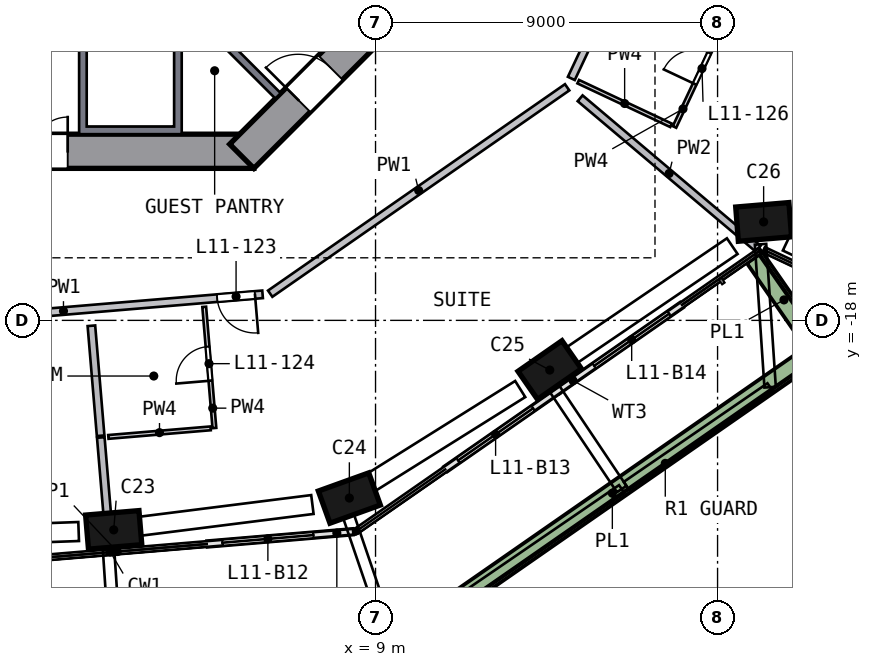
"""IFC4 building model, lengths in metres.
Left out: names, types, materials, properties, quantities, classifications, styles, units other than length and angle.
Written with IfcOpenShell. Run it as: python <this file> out.ifc"""

import sys

from ifc_helpers import new_model, si_unit, direction, frame, frame_2d, origin, origin_2d, place, context, subcontext, project, spatial, polyline, rectangle, outline, extrude, element, fill, save


model = new_model("IFC4")
c1 = context("Model", 3, precision=1e-05, world=origin(), true_north=direction((0.0, 1.0)))
c2 = subcontext(c1, "Body", "Model", "MODEL_VIEW")
j1 = project(units=[si_unit("LENGTHUNIT", "METRE"), si_unit("PLANEANGLEUNIT", "RADIAN")], contexts=[c1])
p1 = place(None, origin())
s1 = spatial("IfcSite", under=j1, at=p1, CompositionType="ELEMENT")
p2 = place(p1, origin())
s2 = spatial("IfcBuilding", under=s1, at=p2, CompositionType="ELEMENT")
p3 = place(p2, frame((0.0, 0.0, 53.0)))
s3 = spatial("IfcBuildingStorey", under=s2, at=p3, CompositionType="ELEMENT", Elevation=53.0)
p4 = place(p3, frame((1.976, -23.525, 0.0), z_axis=(0.111794513, 0.010266843, 0.993678307), x_axis=(0.990250205, 0.082474278, -0.11226097)))
e1 = element("IfcColumn", 1, at=p4, inside=s3, PredefinedType="COLUMN", context=c2, shape_type="SweptSolid", body=[
    extrude(rectangle(XDim=1.4, YDim=0.9, at=origin_2d()), origin(), (0.0, 0.0, 1.0), 3.21),
])
p5 = place(p3, frame((8.181, -22.723, 0.0), z_axis=(0.107731963, 0.03976275, 0.993384491), x_axis=(-0.934820186, -0.336043012, 0.114831678)))
e2 = element("IfcColumn", 2, at=p5, inside=s3, PredefinedType="COLUMN", context=c2, shape_type="SweptSolid", body=[
    extrude(rectangle(XDim=1.4, YDim=0.9, at=origin_2d()), origin(), (0.0, 0.0, 1.0), 3.211),
])
p6 = place(p3, frame((13.474, -19.386, 0.0), z_axis=(0.091640946, 0.064871143, 0.993676845), x_axis=(0.815879269, 0.567217406, -0.112273915)))
e3 = element("IfcColumn", 3, at=p6, inside=s3, PredefinedType="COLUMN", context=c2, shape_type="SweptSolid", body=[
    extrude(rectangle(XDim=1.4, YDim=0.9, at=origin_2d()), origin(), (0.0, 0.0, 1.0), 3.21),
])
p7 = place(p3, frame((19.124, -15.52, 0.0), z_axis=(0.073043234, 0.091589071, 0.993114358), x_axis=(-0.993826622, -0.076691997, 0.080168471)))
e4 = element("IfcColumn", 4, at=p7, inside=s3, PredefinedType="COLUMN", context=c2, shape_type="SweptSolid", body=[
    extrude(rectangle(XDim=1.4, YDim=0.9, at=origin_2d()), origin(), (0.0, 0.0, 1.0), 3.212),
])
p8 = place(p3, frame((-5.799, -13.55, 0.0), z_axis=(0.0, 0.0, 1.0), x_axis=(1.0, 0.0, 0.0)))
e5 = element("IfcWall", 5, at=p8, inside=s3, PredefinedType="SHEAR", context=c2, shape_type="SweptSolid", body=[
    extrude(rectangle(XDim=11.598, YDim=0.9, at=frame_2d((5.799, 0.0))), origin(), (0.0, 0.0, 1.0), 3.5),
])
p9 = place(p8, frame((4.899, 0.0, 0.0)))
e6 = element("IfcOpeningElement", 6, at=p9, cuts=e5, PredefinedType="OPENING", context=c2, shape_type="SweptSolid", body=[
    extrude(rectangle(XDim=1.8, YDim=2.1, at=frame_2d((0.9, 1.05))), frame((0.0, 0.46, 0.0), z_axis=(0.0, -1.0, 0.0), x_axis=(1.0, 0.0, 0.0)), (0.0, 0.0, 1.0), 0.92),
])
p10 = place(p3, frame((5.481, -13.682, 0.0), z_axis=(0.0, 0.0, 1.0), x_axis=(0.707106781, 0.707106781, 0.0)))
e7 = element("IfcWall", 7, at=p10, inside=s3, PredefinedType="SHEAR", context=c2, shape_type="SweptSolid", body=[
    extrude(rectangle(XDim=11.598, YDim=0.9, at=frame_2d((5.799, 0.0))), origin(), (0.0, 0.0, 1.0), 3.5),
])
p11 = place(p10, frame((2.099, 0.0, 0.0)))
e8 = element("IfcOpeningElement", 8, at=p11, cuts=e7, PredefinedType="OPENING", context=c2, shape_type="SweptSolid", body=[
    extrude(rectangle(XDim=1.2, YDim=2.1, at=frame_2d((0.6, 1.05))), frame((0.0, 0.46, 0.0), z_axis=(0.0, -1.0, 0.0), x_axis=(1.0, 0.0, 0.0)), (0.0, 0.0, 1.0), 0.92),
])
p12 = place(p3, frame((4.573, -23.885, 0.0), z_axis=(0.0, 0.0, 1.0), x_axis=(0.996491197, 0.083697634, 0.0)))
e9 = element("IfcWall", 9, at=p12, inside=s3, PredefinedType="SOLIDWALL", context=c2, shape_type="SweptSolid", body=[
    extrude(rectangle(XDim=3.842, YDim=0.15, at=frame_2d((1.921, 0.0))), origin(), (0.0, 0.0, 1.0), 2.425),
])
p13 = place(p12, frame((0.4, 0.0, 0.0)))
e10 = element("IfcOpeningElement", 10, at=p13, cuts=e9, PredefinedType="OPENING", context=c2, shape_type="SweptSolid", body=[
    extrude(rectangle(XDim=2.4, YDim=2.4, at=frame_2d((1.2, 1.2))), frame((0.0, 0.085, 0.0), z_axis=(0.0, -1.0, 0.0), x_axis=(1.0, 0.0, 0.0)), (0.0, 0.0, 1.0), 0.17),
])
p14 = place(p3, frame((10.846, -21.913, 0.0), z_axis=(0.0, 0.0, 1.0), x_axis=(0.821158084, 0.570700799, 0.0)))
e11 = element("IfcWall", 11, at=p14, inside=s3, PredefinedType="SOLIDWALL", context=c2, shape_type="SweptSolid", body=[
    extrude(rectangle(XDim=3.6, YDim=0.15, at=frame_2d((1.8, 0.0))), origin(), (0.0, 0.0, 1.0), 2.425),
])
p15 = place(p14, frame((0.4, 0.0, 0.0)))
e12 = element("IfcOpeningElement", 12, at=p15, cuts=e11, PredefinedType="OPENING", context=c2, shape_type="SweptSolid", body=[
    extrude(rectangle(XDim=2.4, YDim=2.4, at=frame_2d((1.2, 1.2))), frame((0.0, 0.085, 0.0), z_axis=(0.0, -1.0, 0.0), x_axis=(1.0, 0.0, 0.0)), (0.0, 0.0, 1.0), 0.17),
])
p16 = place(p3, frame((13.802, -19.858, 0.0), z_axis=(0.0, 0.0, 1.0), x_axis=(0.821158921, 0.570699594, 0.0)))
e13 = element("IfcWall", 13, at=p16, inside=s3, PredefinedType="SOLIDWALL", context=c2, shape_type="SweptSolid", body=[
    extrude(rectangle(XDim=3.96, YDim=0.15, at=frame_2d((1.98, 0.0))), origin(), (0.0, 0.0, 1.0), 2.425),
])
p17 = place(p16, frame((1.16, 0.0, 0.0)))
e14 = element("IfcOpeningElement", 14, at=p17, cuts=e13, PredefinedType="OPENING", context=c2, shape_type="SweptSolid", body=[
    extrude(rectangle(XDim=2.4, YDim=2.4, at=frame_2d((1.2, 1.2))), frame((0.0, 0.085, 0.0), z_axis=(0.0, -1.0, 0.0), x_axis=(1.0, 0.0, 0.0)), (0.0, 0.0, 1.0), 0.17),
])
p18 = place(p3, frame((9.597, -26.465, 0.0), z_axis=(0.0, 0.0, 1.0), x_axis=(0.821154593, 0.570705822, 0.0)))
e15 = element("IfcWall", 15, at=p18, inside=s3, PredefinedType="SOLIDWALL", context=c2, shape_type="SweptSolid", body=[
    extrude(rectangle(XDim=13.723, YDim=0.5, at=frame_2d((6.862, 0.0))), origin(), (0.0, 0.0, 1.0), 0.7),
])
p19 = place(p3, frame((20.518, -18.57, 0.0), z_axis=(0.0, 0.0, 1.0), x_axis=(-0.570690734, 0.821165079, 0.0)))
e16 = element("IfcWall", 16, at=p19, inside=s3, PredefinedType="SOLIDWALL", context=c2, shape_type="SweptSolid", body=[
    extrude(rectangle(XDim=2.699, YDim=0.5, at=frame_2d((1.35, 0.0))), origin(), (0.0, 0.0, 1.0), 0.7),
])
p20 = place(p3, origin())
e17 = element("IfcWall", 17, at=p20, inside=s3, PredefinedType="SOLIDWALL", context=c2, shape_type="SweptSolid", body=[
    extrude(outline(polyline([(3.9, -10.7), (3.9, -13.1), (1.2, -13.1), (1.2, -10.7), (3.9, -10.7)]), holes=[polyline([(1.4, -12.9), (3.7, -12.9), (3.7, -10.9), (1.4, -10.9), (1.4, -12.9)])]), origin(), (0.0, 0.0, 1.0), 3.19),
])
p21 = place(p3, frame((3.677, -9.334, 0.0), z_axis=(0.0, 0.0, 1.0), x_axis=(0.707106781, -0.707106781, 0.0)))
e18 = element("IfcWall", 18, at=p21, inside=s3, PredefinedType="SOLIDWALL", context=c2, shape_type="SweptSolid", body=[
    extrude(rectangle(XDim=3.9, YDim=0.2, at=frame_2d((1.95, 0.0))), origin(), (0.0, 0.0, 1.0), 3.19),
])
p22 = place(p3, frame((6.028, -17.315, 0.0), z_axis=(0.0, 0.0, 1.0), x_axis=(-0.996493661, -0.083668294, 0.0)))
e19 = element("IfcWall", 19, at=p22, inside=s3, PredefinedType="SOLIDWALL", context=c2, shape_type="SweptSolid", body=[
    extrude(rectangle(XDim=9.116, YDim=0.2, at=frame_2d((4.558, 0.0))), origin(), (0.0, 0.0, 1.0), 3.19),
])
p23 = place(p22, frame((0.2, 0.0, 0.0)))
e20 = element("IfcOpeningElement", 20, at=p23, cuts=e19, PredefinedType="OPENING", context=c2, shape_type="SweptSolid", body=[
    extrude(rectangle(XDim=1.0, YDim=2.1, at=frame_2d((0.5, 1.05))), frame((0.0, 0.11, 0.0), z_axis=(0.0, -1.0, 0.0), x_axis=(1.0, 0.0, 0.0)), (0.0, 0.0, 1.0), 0.22),
])
p24 = place(p3, frame((6.228, -17.298, 0.0), z_axis=(0.0, 0.0, 1.0), x_axis=(0.821154553, 0.570705878, 0.0)))
e21 = element("IfcWall", 21, at=p24, inside=s3, PredefinedType="SOLIDWALL", context=c2, shape_type="SweptSolid", body=[
    extrude(rectangle(XDim=9.516, YDim=0.2, at=frame_2d((4.758, 0.0))), origin(), (0.0, 0.0, 1.0), 3.19),
])
p25 = place(p3, frame((14.152, -11.633, 0.0), z_axis=(0.0, 0.0, 1.0), x_axis=(0.425803952, 0.904815448, 0.0)))
e22 = element("IfcWall", 22, at=p25, inside=s3, PredefinedType="SOLIDWALL", context=c2, shape_type="SweptSolid", body=[
    extrude(rectangle(XDim=3.4, YDim=0.2, at=frame_2d((1.7, 0.0))), origin(), (0.0, 0.0, 1.0), 3.19),
])
p26 = place(p3, frame((31.011, -15.809, 0.0), z_axis=(0.0, 0.0, 1.0), x_axis=(-0.904825276, 0.425783066, 0.0)))
e23 = element("IfcWall", 23, at=p26, inside=s3, PredefinedType="SOLIDWALL", context=c2, shape_type="SweptSolid", body=[
    extrude(rectangle(XDim=16.833, YDim=0.2, at=frame_2d((8.416, 0.0))), origin(), (0.0, 0.0, 1.0), 3.19),
])
p27 = place(p26, frame((9.0, 0.0, 0.0)))
e24 = element("IfcOpeningElement", 24, at=p27, cuts=e23, PredefinedType="OPENING", context=c2, shape_type="SweptSolid", body=[
    extrude(rectangle(XDim=1.0, YDim=2.1, at=frame_2d((0.5, 1.05))), frame((0.0, 0.11, 0.0), z_axis=(0.0, -1.0, 0.0), x_axis=(1.0, 0.0, 0.0)), (0.0, 0.0, 1.0), 0.22),
])
p28 = place(p3, frame((16.537, -6.566, 0.0), z_axis=(0.0, 0.0, 1.0), x_axis=(0.904826173, -0.42578116, 0.0)))
e25 = element("IfcWall", 25, at=p28, inside=s3, PredefinedType="SOLIDWALL", context=c2, shape_type="SweptSolid", body=[
    extrude(rectangle(XDim=17.033, YDim=0.2, at=frame_2d((8.516, 0.0))), origin(), (0.0, 0.0, 1.0), 3.19),
])
p29 = place(p28, frame((4.05, 0.0, 0.0)))
e26 = element("IfcOpeningElement", 26, at=p29, cuts=e25, PredefinedType="OPENING", context=c2, shape_type="SweptSolid", body=[
    extrude(rectangle(XDim=1.0, YDim=2.1, at=frame_2d((0.5, 1.05))), frame((0.0, 0.11, 0.0), z_axis=(0.0, -1.0, 0.0), x_axis=(1.0, 0.0, 0.0)), (0.0, 0.0, 1.0), 0.22),
])
p30 = place(p3, frame((1.523, -18.142, 0.0), z_axis=(0.0, 0.0, 1.0), x_axis=(0.083706209, -0.996490477, 0.0)))
e27 = element("IfcWall", 27, at=p30, inside=s3, PredefinedType="SOLIDWALL", context=c2, shape_type="SweptSolid", body=[
    extrude(rectangle(XDim=2.905, YDim=0.2, at=frame_2d((1.453, 0.0))), origin(), (0.0, 0.0, 1.0), 3.19),
])
p31 = place(p3, frame((1.77, -21.082, 0.0), z_axis=(0.0, 0.0, 1.0), x_axis=(0.083695681, -0.996491361, 0.0)))
e28 = element("IfcWall", 28, at=p31, inside=s3, PredefinedType="SOLIDWALL", context=c2, shape_type="SweptSolid", body=[
    extrude(rectangle(XDim=2.952, YDim=0.2, at=frame_2d((1.476, 0.0))), origin(), (0.0, 0.0, 1.0), 3.19),
])
p32 = place(p3, frame((14.384, -12.155, 0.0), z_axis=(0.0, 0.0, 1.0), x_axis=(0.763790865, -0.645463798, 0.0)))
e29 = element("IfcWall", 29, at=p32, inside=s3, PredefinedType="SOLIDWALL", context=c2, shape_type="SweptSolid", body=[
    extrude(rectangle(XDim=6.132, YDim=0.2, at=frame_2d((3.066, 0.0))), origin(), (0.0, 0.0, 1.0), 3.19),
])
p33 = place(p3, frame((4.66, -20.842, 0.0), z_axis=(0.0, 0.0, 1.0), x_axis=(-0.996496321, -0.083636612, 0.0)))
e30 = element("IfcWall", 30, at=p33, inside=s3, PredefinedType="PARTITIONING", context=c2, shape_type="SweptSolid", body=[
    extrude(rectangle(XDim=2.7, YDim=0.1, at=frame_2d((1.35, 0.0))), origin(), (0.0, 0.0, 1.0), 3.19),
])
p34 = place(p3, frame((4.76, -20.833, 0.0), z_axis=(0.0, 0.0, 1.0), x_axis=(-0.083695813, 0.99649135, 0.0)))
e31 = element("IfcWall", 31, at=p34, inside=s3, PredefinedType="PARTITIONING", context=c2, shape_type="SweptSolid", body=[
    extrude(rectangle(XDim=3.2, YDim=0.1, at=frame_2d((1.6, 0.0))), origin(), (0.0, 0.0, 1.0), 3.19),
])
p35 = place(p34, frame((1.25, 0.0, 0.0)))
e32 = element("IfcOpeningElement", 32, at=p35, cuts=e31, PredefinedType="OPENING", context=c2, shape_type="SweptSolid", body=[
    extrude(rectangle(XDim=0.9, YDim=2.1, at=frame_2d((0.45, 1.05))), frame((0.0, 0.06, 0.0), z_axis=(0.0, -1.0, 0.0), x_axis=(1.0, 0.0, 0.0)), (0.0, 0.0, 1.0), 0.12),
])
p36 = place(p3, frame((16.776, -12.868, 0.0), z_axis=(0.0, 0.0, 1.0), x_axis=(-0.904808455, 0.42581881, 0.0)))
e33 = element("IfcWall", 33, at=p36, inside=s3, PredefinedType="PARTITIONING", context=c2, shape_type="SweptSolid", body=[
    extrude(rectangle(XDim=2.7, YDim=0.1, at=frame_2d((1.35, 0.0))), origin(), (0.0, 0.0, 1.0), 3.19),
])
p37 = place(p3, frame((16.867, -12.91, 0.0), z_axis=(0.0, 0.0, 1.0), x_axis=(0.425786014, 0.904823889, 0.0)))
e34 = element("IfcWall", 34, at=p37, inside=s3, PredefinedType="PARTITIONING", context=c2, shape_type="SweptSolid", body=[
    extrude(rectangle(XDim=3.2, YDim=0.1, at=frame_2d((1.6, 0.0))), origin(), (0.0, 0.0, 1.0), 3.19),
])
p38 = place(p37, frame((1.25, 0.0, 0.0)))
e35 = element("IfcOpeningElement", 35, at=p38, cuts=e34, PredefinedType="OPENING", context=c2, shape_type="SweptSolid", body=[
    extrude(rectangle(XDim=0.9, YDim=2.1, at=frame_2d((0.45, 1.05))), frame((0.0, 0.06, 0.0), z_axis=(0.0, -1.0, 0.0), x_axis=(1.0, 0.0, 0.0)), (0.0, 0.0, 1.0), 0.12),
])
p39 = place(p13, origin())
e36 = element("IfcDoor", 36, at=p39, inside=s3, OperationType="SLIDING_TO_RIGHT", PredefinedType="DOOR", context=c2, shape_type="SweptSolid", body=[
    extrude(rectangle(XDim=2.4, YDim=2.4, at=frame_2d((1.2, 1.2))), frame((0.0, 0.025, 0.0), z_axis=(0.0, -1.0, 0.0), x_axis=(1.0, 0.0, 0.0)), (0.0, 0.0, 1.0), 0.05),
])
fill(e10, e36)
p40 = place(p15, origin())
e37 = element("IfcDoor", 37, at=p40, inside=s3, OperationType="SLIDING_TO_RIGHT", PredefinedType="DOOR", context=c2, shape_type="SweptSolid", body=[
    extrude(rectangle(XDim=2.4, YDim=2.4, at=frame_2d((1.2, 1.2))), frame((0.0, 0.025, 0.0), z_axis=(0.0, -1.0, 0.0), x_axis=(1.0, 0.0, 0.0)), (0.0, 0.0, 1.0), 0.05),
])
fill(e12, e37)
p41 = place(p17, origin())
e38 = element("IfcDoor", 38, at=p41, inside=s3, OperationType="SLIDING_TO_LEFT", PredefinedType="DOOR", context=c2, shape_type="SweptSolid", body=[
    extrude(rectangle(XDim=2.4, YDim=2.4, at=frame_2d((1.2, 1.2))), frame((0.0, 0.025, 0.0), z_axis=(0.0, -1.0, 0.0), x_axis=(1.0, 0.0, 0.0)), (0.0, 0.0, 1.0), 0.05),
])
fill(e14, e38)
p42 = place(p9, origin())
e39 = element("IfcDoor", 39, at=p42, inside=s3, OperationType="DOUBLE_DOOR_SINGLE_SWING", PredefinedType="DOOR", context=c2, shape_type="SweptSolid", body=[
    extrude(rectangle(XDim=1.8, YDim=2.1, at=frame_2d((0.9, 1.05))), frame((0.0, 0.025, 0.0), z_axis=(0.0, -1.0, 0.0), x_axis=(1.0, 0.0, 0.0)), (0.0, 0.0, 1.0), 0.05),
])
fill(e6, e39)
p43 = place(p11, origin())
e40 = element("IfcDoor", 40, at=p43, inside=s3, OperationType="SINGLE_SWING_LEFT", PredefinedType="DOOR", context=c2, shape_type="SweptSolid", body=[
    extrude(rectangle(XDim=1.2, YDim=2.1, at=frame_2d((0.6, 1.05))), frame((0.0, 0.025, 0.0), z_axis=(0.0, -1.0, 0.0), x_axis=(1.0, 0.0, 0.0)), (0.0, 0.0, 1.0), 0.05),
])
fill(e8, e40)
p44 = place(p23, origin())
e41 = element("IfcDoor", 41, at=p44, inside=s3, OperationType="SINGLE_SWING_LEFT", PredefinedType="DOOR", context=c2, shape_type="SweptSolid", body=[
    extrude(rectangle(XDim=1.0, YDim=2.1, at=frame_2d((0.5, 1.05))), frame((0.0, 0.025, 0.0), z_axis=(0.0, -1.0, 0.0), x_axis=(1.0, 0.0, 0.0)), (0.0, 0.0, 1.0), 0.05),
])
fill(e20, e41)
p45 = place(p35, origin())
e42 = element("IfcDoor", 42, at=p45, inside=s3, OperationType="SINGLE_SWING_LEFT", PredefinedType="DOOR", context=c2, shape_type="SweptSolid", body=[
    extrude(rectangle(XDim=0.9, YDim=2.1, at=frame_2d((0.45, 1.05))), frame((0.0, 0.025, 0.0), z_axis=(0.0, -1.0, 0.0), x_axis=(1.0, 0.0, 0.0)), (0.0, 0.0, 1.0), 0.05),
])
fill(e32, e42)
p46 = place(p38, origin())
e43 = element("IfcDoor", 43, at=p46, inside=s3, OperationType="SINGLE_SWING_LEFT", PredefinedType="DOOR", context=c2, shape_type="SweptSolid", body=[
    extrude(rectangle(XDim=0.9, YDim=2.1, at=frame_2d((0.45, 1.05))), frame((0.0, 0.025, 0.0), z_axis=(0.0, -1.0, 0.0), x_axis=(1.0, 0.0, 0.0)), (0.0, 0.0, 1.0), 0.05),
])
fill(e35, e43)
save(model, sys.argv[1])
